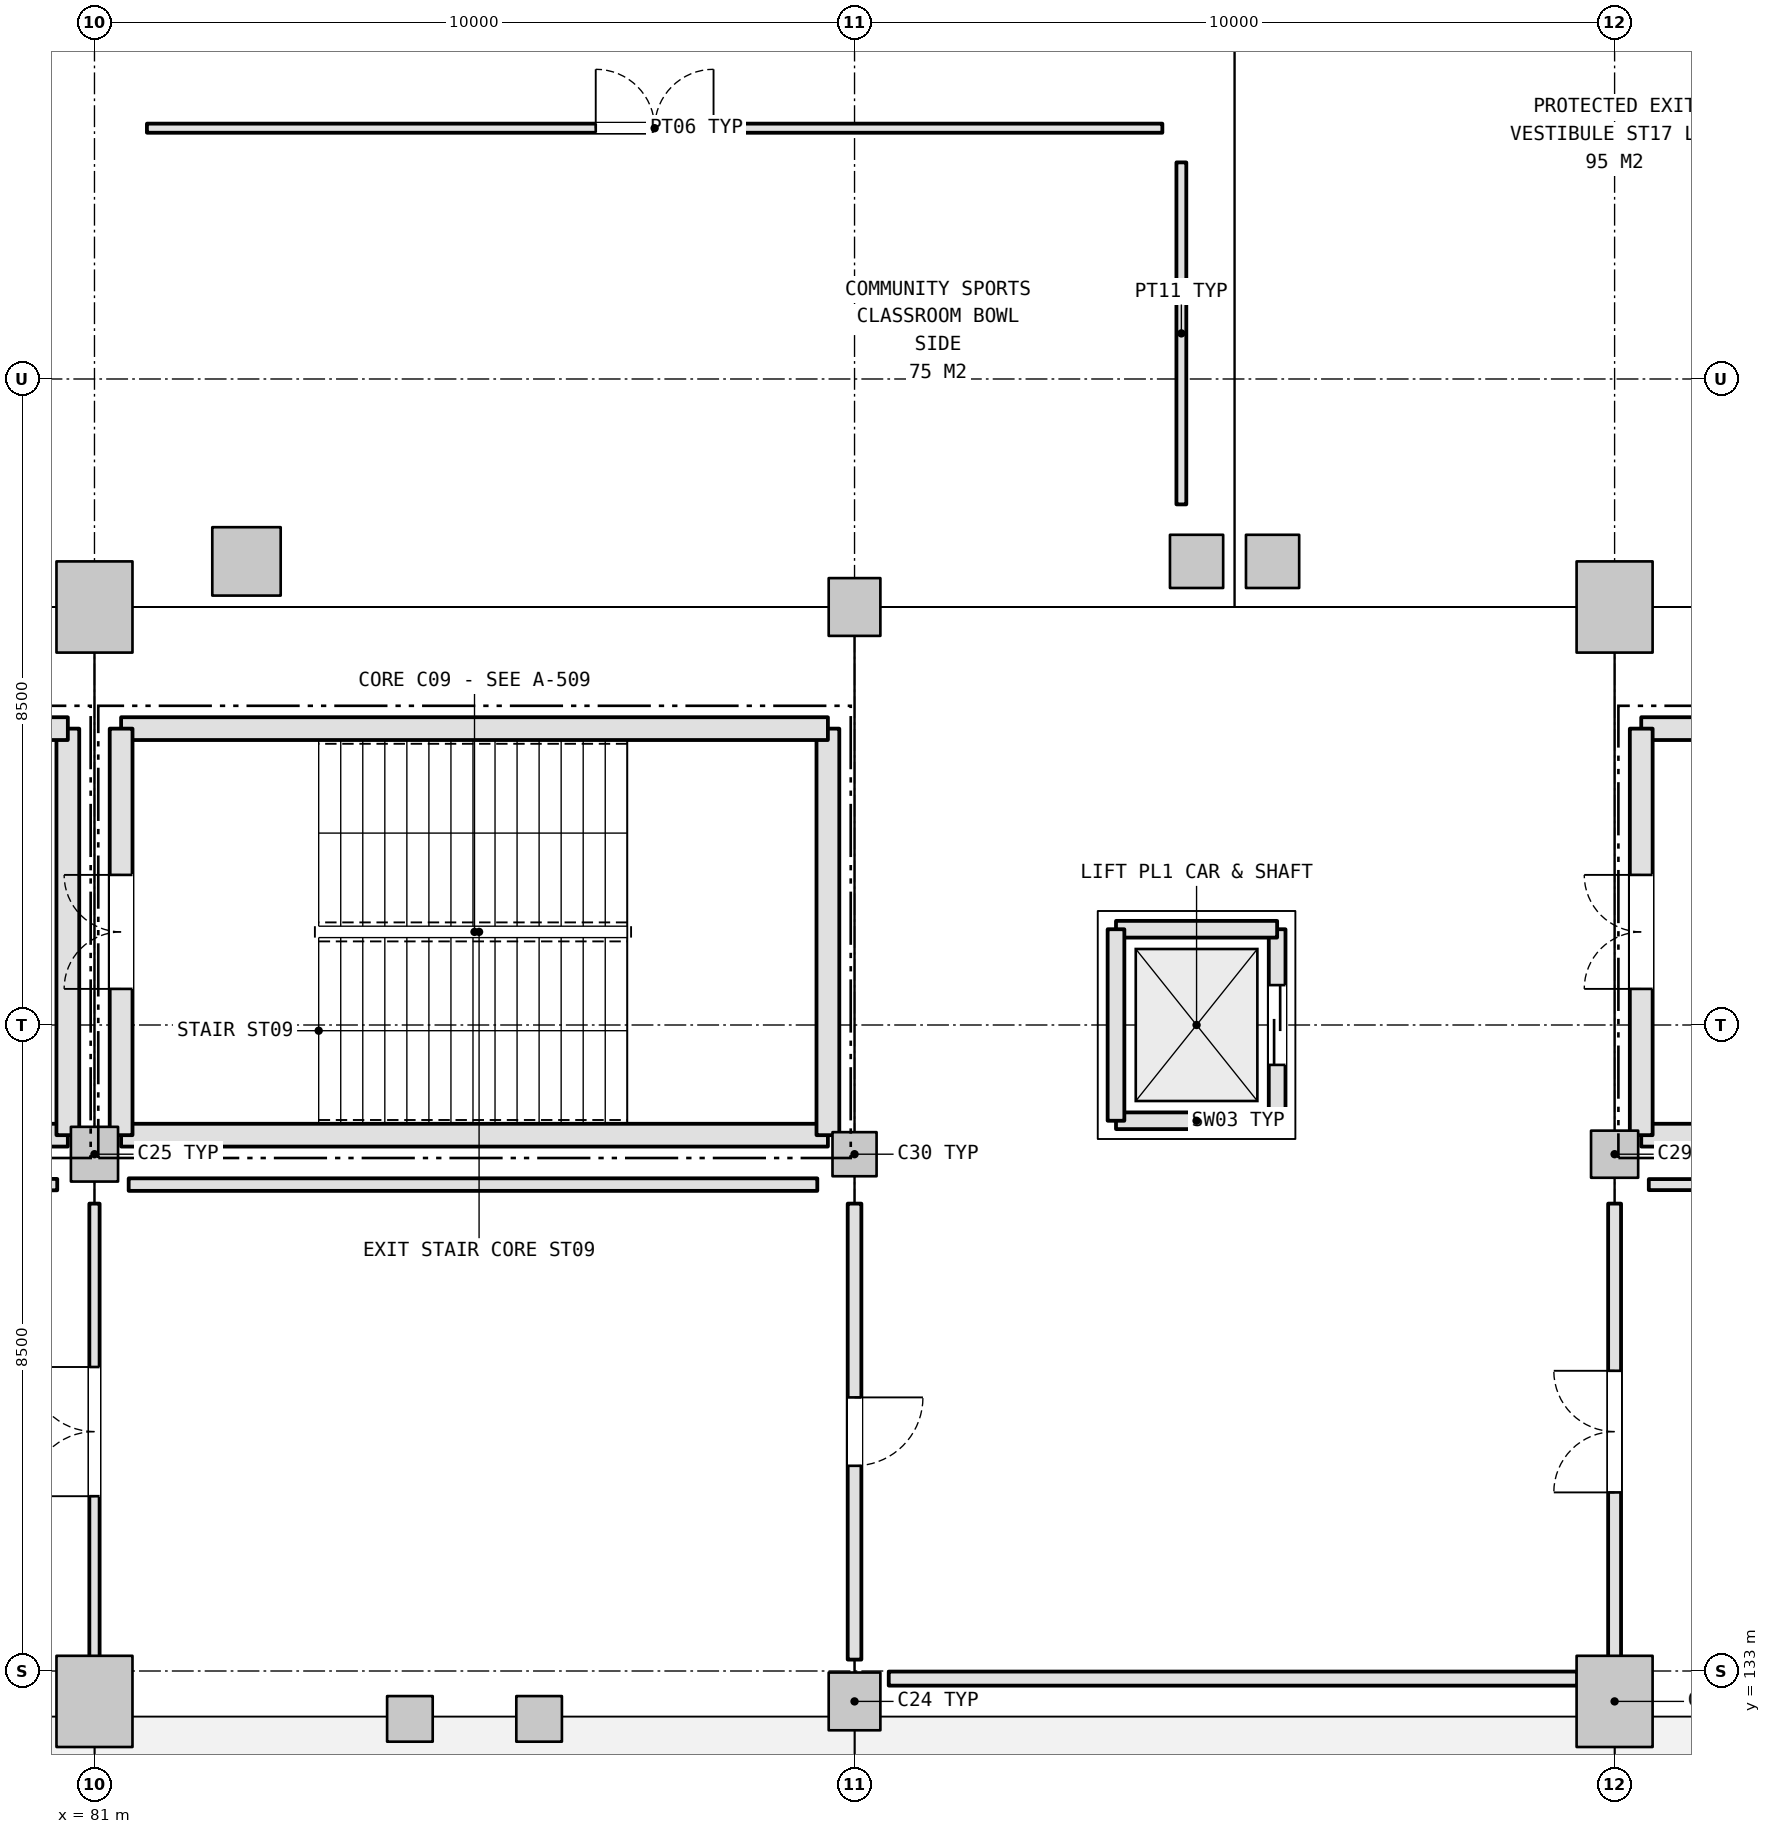
"""IFC4 building model, lengths in metres.
Left out: names, types, materials, properties, quantities, classifications, styles, units other than length and angle.
Written with IfcOpenShell. Run it as: python <this file> out.ifc"""

import sys

from ifc_helpers import new_model, si_unit, direction, frame, frame_2d, origin, origin_2d, place, context, subcontext, project, spatial, rectangle, extrude, element, fill, save


model = new_model("IFC4")
c1 = context("Model", 3, precision=1e-05, world=origin(), true_north=direction((0.0, 1.0)))
c2 = subcontext(c1, "Body", "Model", "MODEL_VIEW")
j1 = project(units=[si_unit("LENGTHUNIT", "METRE"), si_unit("PLANEANGLEUNIT", "RADIAN")], contexts=[c1])
p1 = place(None, origin())
s1 = spatial("IfcSite", under=j1, at=p1, CompositionType="ELEMENT")
p2 = place(p1, origin())
s2 = spatial("IfcBuilding", under=s1, at=p2, CompositionType="ELEMENT")
p3 = place(p2, origin())
s3 = spatial("IfcBuildingStorey", under=s2, at=p3, CompositionType="ELEMENT", Elevation=0.0)
p4 = place(p3, frame((101.0, 132.6, 0.0), z_axis=(0.0, 0.0, 1.0), x_axis=(1.0, 0.0, 0.0)))
e1 = element("IfcColumn", 1, at=p4, inside=s3, PredefinedType="COLUMN", context=c2, shape_type="SweptSolid", body=[
    extrude(rectangle(XDim=1.0, YDim=1.2, at=origin_2d()), origin(), (0.0, 0.0, 1.0), 5.4),
])
p5 = place(p3, frame((101.0, 139.8, 0.0), z_axis=(0.0, 0.0, 1.0), x_axis=(1.0, 0.0, 0.0)))
e2 = element("IfcColumn", 2, at=p5, inside=s3, PredefinedType="COLUMN", context=c2, shape_type="SweptSolid", body=[
    extrude(rectangle(XDim=0.62, YDim=0.62, at=origin_2d()), origin(), (0.0, 0.0, 1.0), 5.4),
])
p6 = place(p3, frame((101.0, 147.0, 0.0), z_axis=(0.0, 0.0, 1.0), x_axis=(1.0, 0.0, 0.0)))
e3 = element("IfcColumn", 3, at=p6, inside=s3, PredefinedType="COLUMN", context=c2, shape_type="SweptSolid", body=[
    extrude(rectangle(XDim=1.0, YDim=1.2, at=origin_2d()), origin(), (0.0, 0.0, 1.0), 5.4),
])
p7 = place(p3, frame((91.0, 132.6, 0.0), z_axis=(0.0, 0.0, 1.0), x_axis=(1.0, 0.0, 0.0)))
e4 = element("IfcColumn", 4, at=p7, inside=s3, PredefinedType="COLUMN", context=c2, shape_type="SweptSolid", body=[
    extrude(rectangle(XDim=0.68, YDim=0.76, at=origin_2d()), origin(), (0.0, 0.0, 1.0), 5.4),
])
p8 = place(p3, frame((91.0, 139.8, 0.0), z_axis=(0.0, 0.0, 1.0), x_axis=(1.0, 0.0, 0.0)))
e5 = element("IfcColumn", 5, at=p8, inside=s3, PredefinedType="COLUMN", context=c2, shape_type="SweptSolid", body=[
    extrude(rectangle(XDim=0.58, YDim=0.58, at=origin_2d()), origin(), (0.0, 0.0, 1.0), 5.4),
])
p9 = place(p3, frame((91.0, 147.0, 0.0), z_axis=(0.0, 0.0, 1.0), x_axis=(1.0, 0.0, 0.0)))
e6 = element("IfcColumn", 6, at=p9, inside=s3, PredefinedType="COLUMN", context=c2, shape_type="SweptSolid", body=[
    extrude(rectangle(XDim=0.68, YDim=0.76, at=origin_2d()), origin(), (0.0, 0.0, 1.0), 5.4),
])
p10 = place(p3, frame((81.0, 132.6, 0.0), z_axis=(0.0, 0.0, 1.0), x_axis=(1.0, 0.0, 0.0)))
e7 = element("IfcColumn", 7, at=p10, inside=s3, PredefinedType="COLUMN", context=c2, shape_type="SweptSolid", body=[
    extrude(rectangle(XDim=1.0, YDim=1.2, at=origin_2d()), origin(), (0.0, 0.0, 1.0), 5.4),
])
p11 = place(p3, frame((81.0, 139.8, 0.0), z_axis=(0.0, 0.0, 1.0), x_axis=(1.0, 0.0, 0.0)))
e8 = element("IfcColumn", 8, at=p11, inside=s3, PredefinedType="COLUMN", context=c2, shape_type="SweptSolid", body=[
    extrude(rectangle(XDim=0.62, YDim=0.72, at=origin_2d()), origin(), (0.0, 0.0, 1.0), 5.4),
])
p12 = place(p3, frame((81.0, 147.0, 0.0), z_axis=(0.0, 0.0, 1.0), x_axis=(1.0, 0.0, 0.0)))
e9 = element("IfcColumn", 9, at=p12, inside=s3, PredefinedType="COLUMN", context=c2, shape_type="SweptSolid", body=[
    extrude(rectangle(XDim=1.0, YDim=1.2, at=origin_2d()), origin(), (0.0, 0.0, 1.0), 5.4),
])
p13 = place(p3, frame((83.0, 147.6, 0.0), z_axis=(0.0, 0.0, 1.0), x_axis=(1.0, 0.0, 0.0)))
e10 = element("IfcColumn", 10, at=p13, inside=s3, PredefinedType="COLUMN", context=c2, shape_type="SweptSolid", body=[
    extrude(rectangle(XDim=0.9, YDim=0.9, at=origin_2d()), origin(), (0.0, 0.0, 1.0), 5.4),
])
for number, where, z_axis, x_axis in (
    (11, (95.5, 147.6, 0.0), (0.0, 0.0, 1.0), (1.0, 0.0, 0.0)),
    (12, (96.5, 147.6, 0.0), (0.0, 0.0, 1.0), (1.0, 0.0, 0.0)),
):
    element("IfcColumn", number, at=place(p3, frame(where, z_axis=z_axis, x_axis=x_axis)), inside=s3, PredefinedType="COLUMN", context=c2, shape_type="SweptSolid", body=[
        extrude(rectangle(XDim=0.7, YDim=0.7, at=origin_2d()), origin(), (0.0, 0.0, 1.0), 5.4),
    ])
p14 = place(p3, frame((71.35, 140.05, 0.0), z_axis=(0.0, 0.0, 1.0), x_axis=(1.0, 0.0, 0.0)))
e13 = element("IfcWall", 13, at=p14, inside=s3, PredefinedType="SHEAR", context=c2, shape_type="SweptSolid", body=[
    extrude(rectangle(XDim=9.299, YDim=0.3, at=frame_2d((4.65, 0.0))), origin(), (0.0, 0.0, 1.0), 5.14),
])
p15 = place(p3, frame((80.65, 140.05, 0.0), z_axis=(0.0, 0.0, 1.0), x_axis=(0.0, 1.0, 0.0)))
e14 = element("IfcWall", 14, at=p15, inside=s3, PredefinedType="SHEAR", context=c2, shape_type="SweptSolid", body=[
    extrude(rectangle(XDim=5.349, YDim=0.3, at=frame_2d((2.675, 0.0))), origin(), (0.0, 0.0, 1.0), 5.14),
])
for number, where, z_axis, x_axis in (
    (15, (80.65, 145.4, 0.0), (0.0, 0.0, 1.0), (-1.0, 0.0, 0.0)),
    (16, (81.35, 140.05, 0.0), (0.0, 0.0, 1.0), (1.0, 0.0, 0.0)),
):
    element("IfcWall", number, at=place(p3, frame(where, z_axis=z_axis, x_axis=x_axis)), inside=s3, PredefinedType="SHEAR", context=c2, shape_type="SweptSolid", body=[
        extrude(rectangle(XDim=9.299, YDim=0.3, at=frame_2d((4.65, 0.0))), origin(), (0.0, 0.0, 1.0), 5.14),
    ])
p16 = place(p3, frame((90.65, 140.05, 0.0), z_axis=(0.0, 0.0, 1.0), x_axis=(0.0, 1.0, 0.0)))
e17 = element("IfcWall", 17, at=p16, inside=s3, PredefinedType="SHEAR", context=c2, shape_type="SweptSolid", body=[
    extrude(rectangle(XDim=5.349, YDim=0.3, at=frame_2d((2.675, 0.0))), origin(), (0.0, 0.0, 1.0), 5.14),
])
p17 = place(p3, frame((90.65, 145.4, 0.0), z_axis=(0.0, 0.0, 1.0), x_axis=(-1.0, 0.0, 0.0)))
e18 = element("IfcWall", 18, at=p17, inside=s3, PredefinedType="SHEAR", context=c2, shape_type="SweptSolid", body=[
    extrude(rectangle(XDim=9.299, YDim=0.3, at=frame_2d((4.65, 0.0))), origin(), (0.0, 0.0, 1.0), 5.14),
])
p18 = place(p3, frame((81.35, 145.4, 0.0), z_axis=(0.0, 0.0, 1.0), x_axis=(0.0, -1.0, 0.0)))
e19 = element("IfcWall", 19, at=p18, inside=s3, PredefinedType="SHEAR", context=c2, shape_type="SweptSolid", body=[
    extrude(rectangle(XDim=5.349, YDim=0.3, at=frame_2d((2.675, 0.0))), origin(), (0.0, 0.0, 1.0), 5.14),
])
p19 = place(p18, frame((1.925, 0.0, 0.0)))
e20 = element("IfcOpeningElement", 20, at=p19, cuts=e19, PredefinedType="OPENING", context=c2, shape_type="SweptSolid", body=[
    extrude(rectangle(XDim=1.5, YDim=2.2, at=frame_2d((0.75, 1.1))), frame((0.0, 0.16, 0.0), z_axis=(0.0, -1.0, 0.0), x_axis=(1.0, 0.0, 0.0)), (0.0, 0.0, 1.0), 0.32),
])
for number, where, z_axis, x_axis in (
    (21, (101.35, 140.05, 0.0), (0.0, 0.0, 1.0), (1.0, 0.0, 0.0)),
    (22, (110.65, 145.4, 0.0), (0.0, 0.0, 1.0), (-1.0, 0.0, 0.0)),
):
    element("IfcWall", number, at=place(p3, frame(where, z_axis=z_axis, x_axis=x_axis)), inside=s3, PredefinedType="SHEAR", context=c2, shape_type="SweptSolid", body=[
        extrude(rectangle(XDim=9.299, YDim=0.3, at=frame_2d((4.65, 0.0))), origin(), (0.0, 0.0, 1.0), 5.14),
    ])
p20 = place(p3, frame((101.35, 145.4, 0.0), z_axis=(0.0, 0.0, 1.0), x_axis=(0.0, -1.0, 0.0)))
e23 = element("IfcWall", 23, at=p20, inside=s3, PredefinedType="SHEAR", context=c2, shape_type="SweptSolid", body=[
    extrude(rectangle(XDim=5.349, YDim=0.3, at=frame_2d((2.675, 0.0))), origin(), (0.0, 0.0, 1.0), 5.14),
])
p21 = place(p20, frame((1.925, 0.0, 0.0)))
e24 = element("IfcOpeningElement", 24, at=p21, cuts=e23, PredefinedType="OPENING", context=c2, shape_type="SweptSolid", body=[
    extrude(rectangle(XDim=1.5, YDim=2.2, at=frame_2d((0.75, 1.1))), frame((0.0, 0.16, 0.0), z_axis=(0.0, -1.0, 0.0), x_axis=(1.0, 0.0, 0.0)), (0.0, 0.0, 1.0), 0.32),
])
for number, where, z_axis, x_axis in (
    (25, (85.15, 132.37, 0.0), (0.0, 0.0, 1.0), (1.0, 0.0, 0.0)),
    (26, (86.85, 132.37, 0.0), (0.0, 0.0, 1.0), (1.0, 0.0, 0.0)),
):
    element("IfcColumn", number, at=place(p3, frame(where, z_axis=z_axis, x_axis=x_axis)), inside=s3, PredefinedType="COLUMN", context=c2, shape_type="SweptSolid", body=[
        extrude(rectangle(XDim=0.6, YDim=0.6, at=origin_2d()), origin(), (0.0, 0.0, 1.0), 5.4),
    ])
p22 = place(p3, frame((94.44, 140.24, -1.1), z_axis=(0.0, 0.0, 1.0), x_axis=(1.0, 0.0, 0.0)))
e27 = element("IfcWall", 27, at=p22, inside=s3, PredefinedType="SHEAR", context=c2, shape_type="SweptSolid", body=[
    extrude(rectangle(XDim=2.12, YDim=0.22, at=frame_2d((1.06, 0.0))), origin(), (0.0, 0.0, 1.0), 6.24),
])
p23 = place(p3, frame((96.56, 140.24, -1.1), z_axis=(0.0, 0.0, 1.0), x_axis=(0.0, 1.0, 0.0)))
e28 = element("IfcWall", 28, at=p23, inside=s3, PredefinedType="SHEAR", context=c2, shape_type="SweptSolid", body=[
    extrude(rectangle(XDim=2.52, YDim=0.22, at=frame_2d((1.26, 0.0))), origin(), (0.0, 0.0, 1.0), 6.24),
])
p24 = place(p23, frame((0.735, 0.0, 1.1)))
e29 = element("IfcOpeningElement", 29, at=p24, cuts=e28, PredefinedType="OPENING", context=c2, shape_type="SweptSolid", body=[
    extrude(rectangle(XDim=1.05, YDim=2.15, at=frame_2d((0.525, 1.075))), frame((0.0, 0.12, 0.0), z_axis=(0.0, -1.0, 0.0), x_axis=(1.0, 0.0, 0.0)), (0.0, 0.0, 1.0), 0.24),
])
p25 = place(p3, frame((96.56, 142.76, -1.1), z_axis=(0.0, 0.0, 1.0), x_axis=(-1.0, 0.0, 0.0)))
e30 = element("IfcWall", 30, at=p25, inside=s3, PredefinedType="SHEAR", context=c2, shape_type="SweptSolid", body=[
    extrude(rectangle(XDim=2.12, YDim=0.22, at=frame_2d((1.06, 0.0))), origin(), (0.0, 0.0, 1.0), 6.24),
])
p26 = place(p3, frame((94.44, 142.76, -1.1), z_axis=(0.0, 0.0, 1.0), x_axis=(0.0, -1.0, 0.0)))
e31 = element("IfcWall", 31, at=p26, inside=s3, PredefinedType="SHEAR", context=c2, shape_type="SweptSolid", body=[
    extrude(rectangle(XDim=2.52, YDim=0.22, at=frame_2d((1.26, 0.0))), origin(), (0.0, 0.0, 1.0), 6.24),
])
p27 = place(p3, frame((81.69, 153.3, 0.0), z_axis=(0.0, 0.0, 1.0), x_axis=(1.0, 0.0, 0.0)))
e32 = element("IfcWall", 32, at=p27, inside=s3, PredefinedType="PARTITIONING", context=c2, shape_type="SweptSolid", body=[
    extrude(rectangle(XDim=13.36, YDim=0.12, at=frame_2d((6.68, 0.0))), origin(), (0.0, 0.0, 1.0), 4.525),
])
p28 = place(p27, frame((5.905, 0.0, 0.0)))
e33 = element("IfcOpeningElement", 33, at=p28, cuts=e32, PredefinedType="OPENING", context=c2, shape_type="SweptSolid", body=[
    extrude(rectangle(XDim=1.55, YDim=2.15, at=frame_2d((0.775, 1.075))), frame((0.0, 0.07, 0.0), z_axis=(0.0, -1.0, 0.0), x_axis=(1.0, 0.0, 0.0)), (0.0, 0.0, 1.0), 0.14),
])
p29 = place(p3, frame((95.3, 152.85, 0.0), z_axis=(0.0, 0.0, 1.0), x_axis=(0.0, -1.0, 0.0)))
e34 = element("IfcWall", 34, at=p29, inside=s3, PredefinedType="PARTITIONING", context=c2, shape_type="SweptSolid", body=[
    extrude(rectangle(XDim=4.5, YDim=0.13, at=frame_2d((2.25, 0.0))), origin(), (0.0, 0.0, 1.0), 4.475),
])
p30 = place(p3, frame((101.0, 133.15, 0.0), z_axis=(0.0, 0.0, 1.0), x_axis=(0.0, 1.0, 0.0)))
e35 = element("IfcWall", 35, at=p30, inside=s3, PredefinedType="PARTITIONING", context=c2, shape_type="SweptSolid", body=[
    extrude(rectangle(XDim=6.0, YDim=0.17, at=frame_2d((3.0, 0.0))), origin(), (0.0, 0.0, 1.0), 4.385),
])
p31 = place(p30, frame((2.2, 0.0, 0.0)))
e36 = element("IfcOpeningElement", 36, at=p31, cuts=e35, PredefinedType="OPENING", context=c2, shape_type="SweptSolid", body=[
    extrude(rectangle(XDim=1.6, YDim=2.2, at=frame_2d((0.8, 1.1))), frame((0.0, 0.095, 0.0), z_axis=(0.0, -1.0, 0.0), x_axis=(1.0, 0.0, 0.0)), (0.0, 0.0, 1.0), 0.19),
])
p32 = place(p3, frame((101.45, 139.4, 0.0), z_axis=(0.0, 0.0, 1.0), x_axis=(1.0, 0.0, 0.0)))
e37 = element("IfcWall", 37, at=p32, inside=s3, PredefinedType="PARTITIONING", context=c2, shape_type="SweptSolid", body=[
    extrude(rectangle(XDim=9.06, YDim=0.145, at=frame_2d((4.53, 0.0))), origin(), (0.0, 0.0, 1.0), 5.12),
])
p33 = place(p3, frame((91.0, 133.15, 0.0), z_axis=(0.0, 0.0, 1.0), x_axis=(0.0, 1.0, 0.0)))
e38 = element("IfcWall", 38, at=p33, inside=s3, PredefinedType="PARTITIONING", context=c2, shape_type="SweptSolid", body=[
    extrude(rectangle(XDim=6.0, YDim=0.18, at=frame_2d((3.0, 0.0))), origin(), (0.0, 0.0, 1.0), 4.305),
])
p34 = place(p33, frame((2.55, 0.0, 0.0)))
e39 = element("IfcOpeningElement", 39, at=p34, cuts=e38, PredefinedType="OPENING", context=c2, shape_type="SweptSolid", body=[
    extrude(rectangle(XDim=0.9, YDim=2.1, at=frame_2d((0.45, 1.05))), frame((0.0, 0.1, 0.0), z_axis=(0.0, -1.0, 0.0), x_axis=(1.0, 0.0, 0.0)), (0.0, 0.0, 1.0), 0.2),
])
p35 = place(p3, frame((100.51, 132.9, 0.0), z_axis=(0.0, 0.0, 1.0), x_axis=(-1.0, 0.0, 0.0)))
e40 = element("IfcWall", 40, at=p35, inside=s3, PredefinedType="PARTITIONING", context=c2, shape_type="SweptSolid", body=[
    extrude(rectangle(XDim=9.06, YDim=0.185, at=frame_2d((4.53, 0.0))), origin(), (0.0, 0.0, 1.0), 4.325),
])
p36 = place(p3, frame((81.0, 133.15, 0.0), z_axis=(0.0, 0.0, 1.0), x_axis=(0.0, 1.0, 0.0)))
e41 = element("IfcWall", 41, at=p36, inside=s3, PredefinedType="PARTITIONING", context=c2, shape_type="SweptSolid", body=[
    extrude(rectangle(XDim=6.0, YDim=0.135, at=frame_2d((3.0, 0.0))), origin(), (0.0, 0.0, 1.0), 4.345),
])
p37 = place(p36, frame((2.15, 0.0, 0.0)))
e42 = element("IfcOpeningElement", 42, at=p37, cuts=e41, PredefinedType="OPENING", context=c2, shape_type="SweptSolid", body=[
    extrude(rectangle(XDim=1.7, YDim=2.25, at=frame_2d((0.85, 1.125))), frame((0.0, 0.077, 0.0), z_axis=(0.0, -1.0, 0.0), x_axis=(1.0, 0.0, 0.0)), (0.0, 0.0, 1.0), 0.155),
])
p38 = place(p3, frame((81.45, 139.4, 0.0), z_axis=(0.0, 0.0, 1.0), x_axis=(1.0, 0.0, 0.0)))
e43 = element("IfcWall", 43, at=p38, inside=s3, PredefinedType="PARTITIONING", context=c2, shape_type="SweptSolid", body=[
    extrude(rectangle(XDim=9.06, YDim=0.165, at=frame_2d((4.53, 0.0))), origin(), (0.0, 0.0, 1.0), 5.12),
])
p39 = place(p3, frame((71.45, 139.4, 0.0), z_axis=(0.0, 0.0, 1.0), x_axis=(1.0, 0.0, 0.0)))
e44 = element("IfcWall", 44, at=p39, inside=s3, PredefinedType="PARTITIONING", context=c2, shape_type="SweptSolid", body=[
    extrude(rectangle(XDim=9.06, YDim=0.15, at=frame_2d((4.53, 0.0))), origin(), (0.0, 0.0, 1.0), 5.12),
])
p40 = place(p19, frame((1.5, 0.0, 0.0), z_axis=(0.0, 0.0, 1.0), x_axis=(-1.0, 0.0, 0.0)))
e45 = element("IfcDoor", 45, at=p40, inside=s3, OperationType="DOUBLE_DOOR_SINGLE_SWING", PredefinedType="DOOR", context=c2, shape_type="SweptSolid", body=[
    extrude(rectangle(XDim=1.5, YDim=2.2, at=frame_2d((0.75, 1.1))), frame((0.0, 0.025, 0.0), z_axis=(0.0, -1.0, 0.0), x_axis=(1.0, 0.0, 0.0)), (0.0, 0.0, 1.0), 0.05),
])
fill(e20, e45)
p41 = place(p21, frame((1.5, 0.0, 0.0), z_axis=(0.0, 0.0, 1.0), x_axis=(-1.0, 0.0, 0.0)))
e46 = element("IfcDoor", 46, at=p41, inside=s3, OperationType="DOUBLE_DOOR_SINGLE_SWING", PredefinedType="DOOR", context=c2, shape_type="SweptSolid", body=[
    extrude(rectangle(XDim=1.5, YDim=2.2, at=frame_2d((0.75, 1.1))), frame((0.0, 0.025, 0.0), z_axis=(0.0, -1.0, 0.0), x_axis=(1.0, 0.0, 0.0)), (0.0, 0.0, 1.0), 0.05),
])
fill(e24, e46)
p42 = place(p24, origin())
e47 = element("IfcDoor", 47, at=p42, inside=s3, OperationType="DOUBLE_DOOR_SLIDING", PredefinedType="DOOR", context=c2, shape_type="SweptSolid", body=[
    extrude(rectangle(XDim=1.05, YDim=2.15, at=frame_2d((0.525, 1.075))), frame((0.0, 0.025, 0.0), z_axis=(0.0, -1.0, 0.0), x_axis=(1.0, 0.0, 0.0)), (0.0, 0.0, 1.0), 0.05),
])
fill(e29, e47)
p43 = place(p28, origin())
e48 = element("IfcDoor", 48, at=p43, inside=s3, OperationType="DOUBLE_DOOR_SINGLE_SWING", PredefinedType="DOOR", context=c2, shape_type="SweptSolid", body=[
    extrude(rectangle(XDim=1.55, YDim=2.15, at=frame_2d((0.775, 1.075))), frame((0.0, 0.025, 0.0), z_axis=(0.0, -1.0, 0.0), x_axis=(1.0, 0.0, 0.0)), (0.0, 0.0, 1.0), 0.05),
])
fill(e33, e48)
p44 = place(p31, origin())
e49 = element("IfcDoor", 49, at=p44, inside=s3, OperationType="DOUBLE_DOOR_SINGLE_SWING", PredefinedType="DOOR", context=c2, shape_type="SweptSolid", body=[
    extrude(rectangle(XDim=1.6, YDim=2.2, at=frame_2d((0.8, 1.1))), frame((0.0, 0.025, 0.0), z_axis=(0.0, -1.0, 0.0), x_axis=(1.0, 0.0, 0.0)), (0.0, 0.0, 1.0), 0.05),
])
fill(e36, e49)
p45 = place(p34, frame((0.9, 0.0, 0.0), z_axis=(0.0, 0.0, 1.0), x_axis=(-1.0, 0.0, 0.0)))
e50 = element("IfcDoor", 50, at=p45, inside=s3, OperationType="SINGLE_SWING_RIGHT", PredefinedType="DOOR", context=c2, shape_type="SweptSolid", body=[
    extrude(rectangle(XDim=0.9, YDim=2.1, at=frame_2d((0.45, 1.05))), frame((0.0, 0.025, 0.0), z_axis=(0.0, -1.0, 0.0), x_axis=(1.0, 0.0, 0.0)), (0.0, 0.0, 1.0), 0.05),
])
fill(e39, e50)
p46 = place(p37, origin())
e51 = element("IfcDoor", 51, at=p46, inside=s3, OperationType="DOUBLE_DOOR_SINGLE_SWING", PredefinedType="DOOR", context=c2, shape_type="SweptSolid", body=[
    extrude(rectangle(XDim=1.7, YDim=2.25, at=frame_2d((0.85, 1.125))), frame((0.0, 0.025, 0.0), z_axis=(0.0, -1.0, 0.0), x_axis=(1.0, 0.0, 0.0)), (0.0, 0.0, 1.0), 0.05),
])
fill(e42, e51)
save(model, sys.argv[1])
